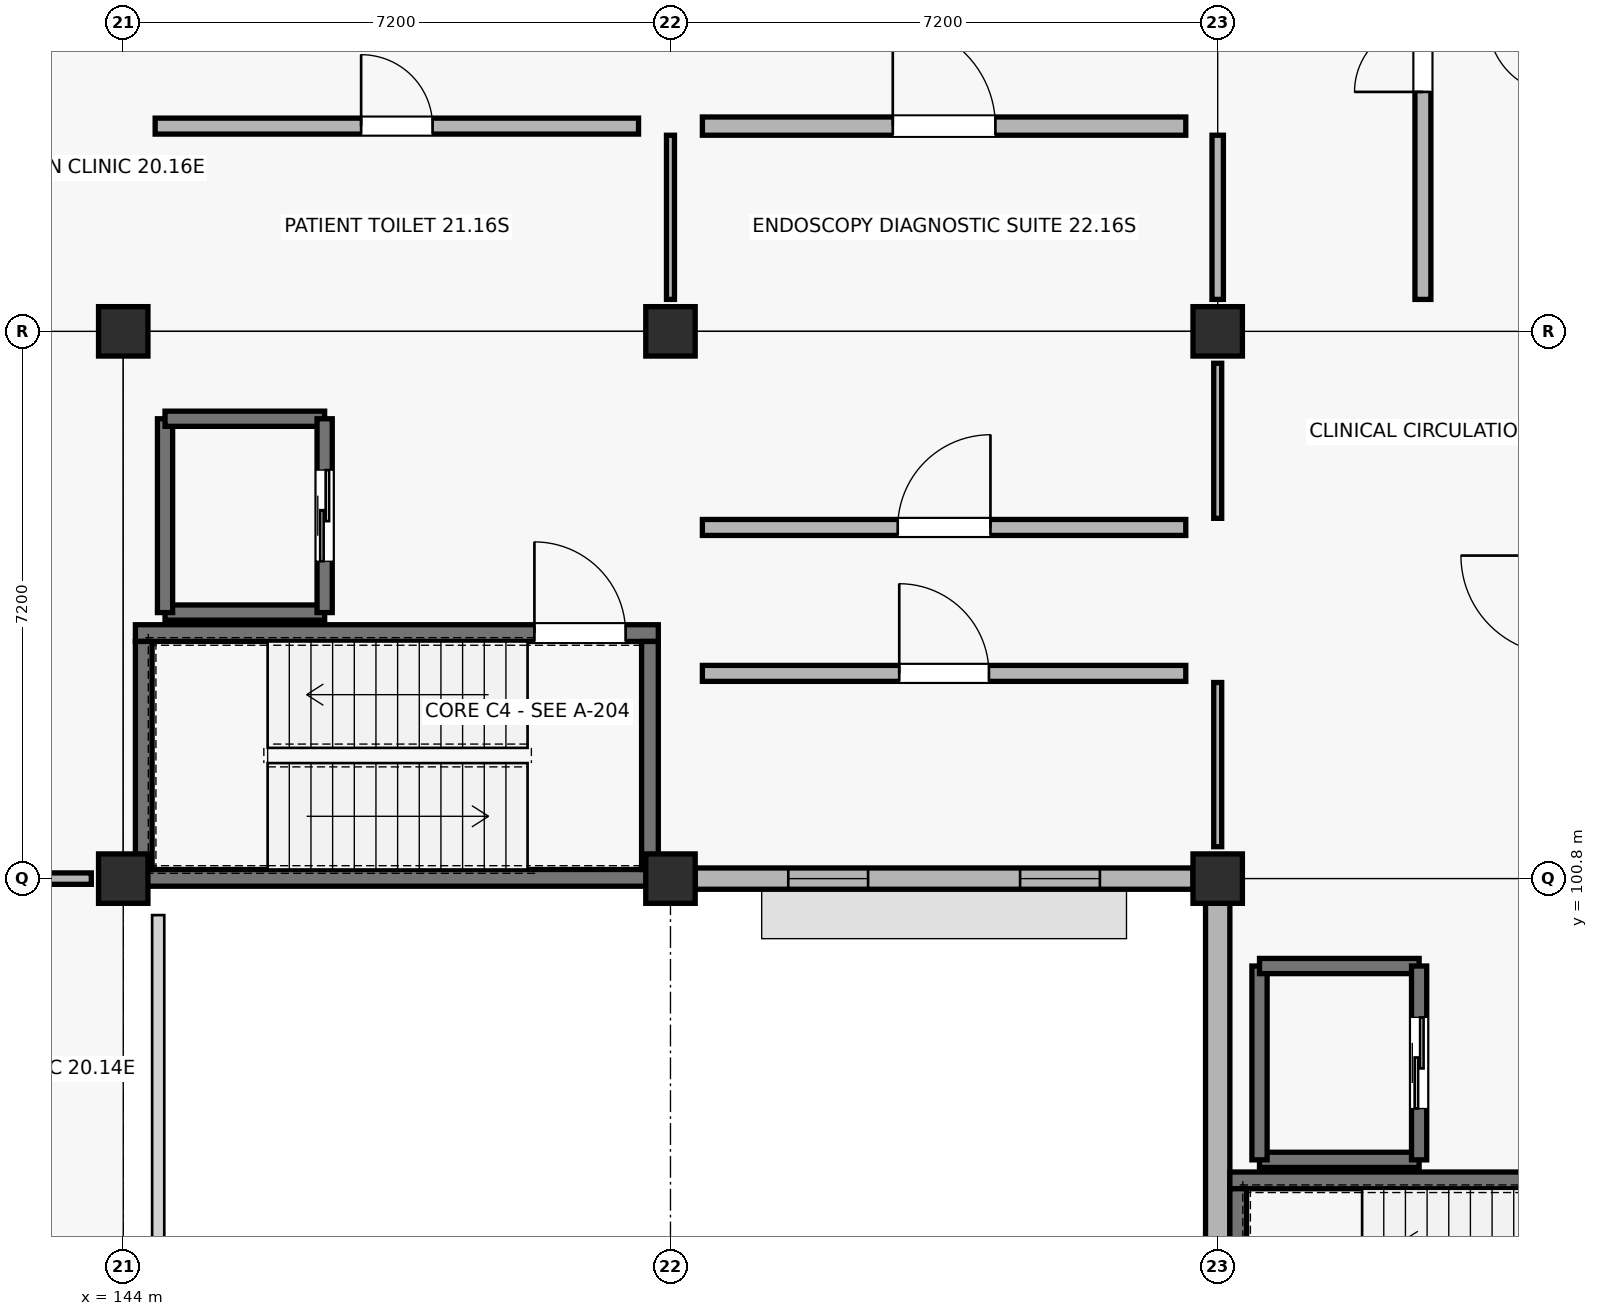
"""IFC4 building model, lengths in metres.
Left out: names, types, materials, properties, quantities, classifications, styles, units other than length and angle.
Written with IfcOpenShell. Run it as: python <this file> out.ifc"""

import sys

from ifc_helpers import new_model, si_unit, direction, frame, frame_2d, origin, origin_2d, place, context, subcontext, project, spatial, rectangle, extrude, element, fill, save


model = new_model("IFC4")
c1 = context("Model", 3, precision=1e-05, world=origin(), true_north=direction((0.0, 1.0)))
c2 = subcontext(c1, "Body", "Model", "MODEL_VIEW")
j1 = project(units=[si_unit("LENGTHUNIT", "METRE"), si_unit("PLANEANGLEUNIT", "RADIAN")], contexts=[c1])
p1 = place(None, origin())
s1 = spatial("IfcSite", under=j1, at=p1, CompositionType="ELEMENT")
p2 = place(p1, origin())
s2 = spatial("IfcBuilding", under=s1, at=p2, CompositionType="ELEMENT")
p3 = place(p2, frame((0.0, 0.0, 4.5)))
s3 = spatial("IfcBuildingStorey", under=s2, at=p3, CompositionType="ELEMENT", Elevation=4.5)
for number, where, z_axis, x_axis in (
    (1, (144.0, 100.8, 0.0), (0.0, 0.0, 1.0), (1.0, 0.0, 0.0)),
    (2, (144.0, 108.0, 0.0), (0.0, 0.0, 1.0), (1.0, 0.0, 0.0)),
    (3, (151.2, 100.8, 0.0), (0.0, 0.0, 1.0), (1.0, 0.0, 0.0)),
    (4, (151.2, 108.0, 0.0), (0.0, 0.0, 1.0), (1.0, 0.0, 0.0)),
    (5, (158.4, 100.8, 0.0), (0.0, 0.0, 1.0), (1.0, 0.0, 0.0)),
    (6, (158.4, 108.0, 0.0), (0.0, 0.0, 1.0), (1.0, 0.0, 0.0)),
):
    element("IfcColumn", number, at=place(p3, frame(where, z_axis=z_axis, x_axis=x_axis)), inside=s3, PredefinedType="COLUMN", context=c2, shape_type="SweptSolid", body=[
        extrude(rectangle(XDim=0.65, YDim=0.65, at=origin_2d()), origin(), (0.0, 0.0, 1.0), 4.5),
    ])
p4 = place(p3, frame((151.525, 100.8, 0.0), z_axis=(0.0, 0.0, 1.0), x_axis=(1.0, 0.0, 0.0)))
e7 = element("IfcWall", 7, at=p4, inside=s3, PredefinedType="STANDARD", context=c2, shape_type="SweptSolid", body=[
    extrude(rectangle(XDim=6.55, YDim=0.28, at=frame_2d((3.275, 0.0))), origin(), (0.0, 0.0, 1.0), 3.47),
])
p5 = place(p4, frame((1.225, 0.0, 0.9)))
e8 = element("IfcOpeningElement", 8, at=p5, cuts=e7, PredefinedType="OPENING", context=c2, shape_type="SweptSolid", body=[
    extrude(rectangle(XDim=1.05, YDim=1.38, at=frame_2d((0.525, 0.69))), frame((0.0, 0.15, 0.0), z_axis=(0.0, -1.0, 0.0), x_axis=(1.0, 0.0, 0.0)), (0.0, 0.0, 1.0), 0.3),
])
p6 = place(p4, frame((4.275, 0.0, 0.9)))
e9 = element("IfcOpeningElement", 9, at=p6, cuts=e7, PredefinedType="OPENING", context=c2, shape_type="SweptSolid", body=[
    extrude(rectangle(XDim=1.05, YDim=1.38, at=frame_2d((0.525, 0.69))), frame((0.0, 0.15, 0.0), z_axis=(0.0, -1.0, 0.0), x_axis=(1.0, 0.0, 0.0)), (0.0, 0.0, 1.0), 0.3),
])
p7 = place(p3, frame((158.4, 100.475, 0.0), z_axis=(0.0, 0.0, 1.0), x_axis=(0.0, -1.0, 0.0)))
e10 = element("IfcWall", 10, at=p7, inside=s3, PredefinedType="STANDARD", context=c2, shape_type="SweptSolid", body=[
    extrude(rectangle(XDim=6.55, YDim=0.32, at=frame_2d((3.275, 0.0))), origin(), (0.0, 0.0, 1.0), 3.52),
])
p8 = place(p3, frame((158.56, 96.83, 0.0), z_axis=(0.0, 0.0, 1.0), x_axis=(1.0, 0.0, 0.0)))
e11 = element("IfcWall", 11, at=p8, inside=s3, PredefinedType="SHEAR", context=c2, shape_type="SweptSolid", body=[
    extrude(rectangle(XDim=6.88, YDim=0.22, at=frame_2d((3.44, 0.0))), origin(), (0.0, 0.0, 1.0), 4.22),
])
p9 = place(p8, frame((5.25, 0.0, 0.0)))
e12 = element("IfcOpeningElement", 12, at=p9, cuts=e11, PredefinedType="OPENING", context=c2, shape_type="SweptSolid", body=[
    extrude(rectangle(XDim=1.2, YDim=2.15, at=frame_2d((0.6, 1.075))), frame((0.0, 0.12, 0.0), z_axis=(0.0, -1.0, 0.0), x_axis=(1.0, 0.0, 0.0)), (0.0, 0.0, 1.0), 0.24),
])
p10 = place(p3, frame((158.67, 93.72, 0.0), z_axis=(0.0, 0.0, 1.0), x_axis=(0.0, 1.0, 0.0)))
e13 = element("IfcWall", 13, at=p10, inside=s3, PredefinedType="SHEAR", context=c2, shape_type="SweptSolid", body=[
    extrude(rectangle(XDim=3.0, YDim=0.22, at=frame_2d((1.5, 0.0))), origin(), (0.0, 0.0, 1.0), 4.22),
])
p11 = place(p3, frame((158.95, 97.1, 0.0), z_axis=(0.0, 0.0, 1.0), x_axis=(1.0, 0.0, 0.0)))
e14 = element("IfcWall", 14, at=p11, inside=s3, PredefinedType="SHEAR", context=c2, shape_type="SweptSolid", body=[
    extrude(rectangle(XDim=2.1, YDim=0.2, at=frame_2d((1.05, 0.0))), origin(), (0.0, 0.0, 1.0), 4.22),
])
p12 = place(p3, frame((158.95, 97.1, 0.0), z_axis=(0.0, 0.0, 1.0), x_axis=(0.0, 1.0, 0.0)))
e15 = element("IfcWall", 15, at=p12, inside=s3, PredefinedType="SHEAR", context=c2, shape_type="SweptSolid", body=[
    extrude(rectangle(XDim=2.55, YDim=0.2, at=frame_2d((1.275, 0.0))), origin(), (0.0, 0.0, 1.0), 4.22),
])
p13 = place(p3, frame((158.95, 99.65, 0.0), z_axis=(0.0, 0.0, 1.0), x_axis=(1.0, 0.0, 0.0)))
e16 = element("IfcWall", 16, at=p13, inside=s3, PredefinedType="SHEAR", context=c2, shape_type="SweptSolid", body=[
    extrude(rectangle(XDim=2.1, YDim=0.2, at=frame_2d((1.05, 0.0))), origin(), (0.0, 0.0, 1.0), 4.22),
])
p14 = place(p3, frame((161.05, 97.1, 0.0), z_axis=(0.0, 0.0, 1.0), x_axis=(0.0, 1.0, 0.0)))
e17 = element("IfcWall", 17, at=p14, inside=s3, PredefinedType="SHEAR", context=c2, shape_type="SweptSolid", body=[
    extrude(rectangle(XDim=2.55, YDim=0.2, at=frame_2d((1.275, 0.0))), origin(), (0.0, 0.0, 1.0), 4.22),
])
p15 = place(p14, frame((0.675, 0.0, 0.0)))
e18 = element("IfcOpeningElement", 18, at=p15, cuts=e17, PredefinedType="OPENING", context=c2, shape_type="SweptSolid", body=[
    extrude(rectangle(XDim=1.2, YDim=2.15, at=frame_2d((0.6, 1.075))), frame((0.0, 0.11, 0.0), z_axis=(0.0, -1.0, 0.0), x_axis=(1.0, 0.0, 0.0)), (0.0, 0.0, 1.0), 0.22),
])
p16 = place(p3, frame((144.16, 100.81, 0.0), z_axis=(0.0, 0.0, 1.0), x_axis=(1.0, 0.0, 0.0)))
e19 = element("IfcWall", 19, at=p16, inside=s3, PredefinedType="SHEAR", context=c2, shape_type="SweptSolid", body=[
    extrude(rectangle(XDim=6.88, YDim=0.22, at=frame_2d((3.44, 0.0))), origin(), (0.0, 0.0, 1.0), 4.22),
])
p17 = place(p3, frame((144.16, 104.03, 0.0), z_axis=(0.0, 0.0, 1.0), x_axis=(1.0, 0.0, 0.0)))
e20 = element("IfcWall", 20, at=p17, inside=s3, PredefinedType="SHEAR", context=c2, shape_type="SweptSolid", body=[
    extrude(rectangle(XDim=6.88, YDim=0.22, at=frame_2d((3.44, 0.0))), origin(), (0.0, 0.0, 1.0), 4.22),
])
p18 = place(p17, frame((5.25, 0.0, 0.0)))
e21 = element("IfcOpeningElement", 21, at=p18, cuts=e20, PredefinedType="OPENING", context=c2, shape_type="SweptSolid", body=[
    extrude(rectangle(XDim=1.2, YDim=2.15, at=frame_2d((0.6, 1.075))), frame((0.0, 0.12, 0.0), z_axis=(0.0, -1.0, 0.0), x_axis=(1.0, 0.0, 0.0)), (0.0, 0.0, 1.0), 0.24),
])
for number, where, z_axis, x_axis in (
    (22, (144.27, 100.92, 0.0), (0.0, 0.0, 1.0), (0.0, 1.0, 0.0)),
    (23, (150.93, 100.92, 0.0), (0.0, 0.0, 1.0), (0.0, 1.0, 0.0)),
):
    element("IfcWall", number, at=place(p3, frame(where, z_axis=z_axis, x_axis=x_axis)), inside=s3, PredefinedType="SHEAR", context=c2, shape_type="SweptSolid", body=[
        extrude(rectangle(XDim=3.0, YDim=0.22, at=frame_2d((1.5, 0.0))), origin(), (0.0, 0.0, 1.0), 4.22),
    ])
p19 = place(p3, frame((144.55, 104.3, 0.0), z_axis=(0.0, 0.0, 1.0), x_axis=(1.0, 0.0, 0.0)))
e24 = element("IfcWall", 24, at=p19, inside=s3, PredefinedType="SHEAR", context=c2, shape_type="SweptSolid", body=[
    extrude(rectangle(XDim=2.1, YDim=0.2, at=frame_2d((1.05, 0.0))), origin(), (0.0, 0.0, 1.0), 4.22),
])
p20 = place(p3, frame((144.55, 104.3, 0.0), z_axis=(0.0, 0.0, 1.0), x_axis=(0.0, 1.0, 0.0)))
e25 = element("IfcWall", 25, at=p20, inside=s3, PredefinedType="SHEAR", context=c2, shape_type="SweptSolid", body=[
    extrude(rectangle(XDim=2.55, YDim=0.2, at=frame_2d((1.275, 0.0))), origin(), (0.0, 0.0, 1.0), 4.22),
])
p21 = place(p3, frame((144.55, 106.85, 0.0), z_axis=(0.0, 0.0, 1.0), x_axis=(1.0, 0.0, 0.0)))
e26 = element("IfcWall", 26, at=p21, inside=s3, PredefinedType="SHEAR", context=c2, shape_type="SweptSolid", body=[
    extrude(rectangle(XDim=2.1, YDim=0.2, at=frame_2d((1.05, 0.0))), origin(), (0.0, 0.0, 1.0), 4.22),
])
p22 = place(p3, frame((146.65, 104.3, 0.0), z_axis=(0.0, 0.0, 1.0), x_axis=(0.0, 1.0, 0.0)))
e27 = element("IfcWall", 27, at=p22, inside=s3, PredefinedType="SHEAR", context=c2, shape_type="SweptSolid", body=[
    extrude(rectangle(XDim=2.55, YDim=0.2, at=frame_2d((1.275, 0.0))), origin(), (0.0, 0.0, 1.0), 4.22),
])
p23 = place(p22, frame((0.675, 0.0, 0.0)))
e28 = element("IfcOpeningElement", 28, at=p23, cuts=e27, PredefinedType="OPENING", context=c2, shape_type="SweptSolid", body=[
    extrude(rectangle(XDim=1.2, YDim=2.15, at=frame_2d((0.6, 1.075))), frame((0.0, 0.11, 0.0), z_axis=(0.0, -1.0, 0.0), x_axis=(1.0, 0.0, 0.0)), (0.0, 0.0, 1.0), 0.22),
])
p24 = place(p3, frame((141.42, 100.8, 0.0), z_axis=(0.0, 0.0, 1.0), x_axis=(1.0, 0.0, 0.0)))
e29 = element("IfcWall", 29, at=p24, inside=s3, PredefinedType="PARTITIONING", context=c2, shape_type="SweptSolid", body=[
    extrude(rectangle(XDim=2.16, YDim=0.15, at=frame_2d((1.08, 0.0))), origin(), (0.0, 0.0, 1.0), 3.36),
])
p25 = place(p3, frame((144.42, 110.7, 0.0), z_axis=(0.0, 0.0, 1.0), x_axis=(1.0, 0.0, 0.0)))
e30 = element("IfcWall", 30, at=p25, inside=s3, PredefinedType="PLUMBINGWALL", context=c2, shape_type="SweptSolid", body=[
    extrude(rectangle(XDim=6.36, YDim=0.21, at=frame_2d((3.18, 0.0))), origin(), (0.0, 0.0, 1.0), 3.36),
])
p26 = place(p25, frame((2.71, 0.0, 0.0)))
e31 = element("IfcOpeningElement", 31, at=p26, cuts=e30, PredefinedType="OPENING", context=c2, shape_type="SweptSolid", body=[
    extrude(rectangle(XDim=0.94, YDim=2.19, at=frame_2d((0.47, 1.095))), frame((0.0, 0.115, 0.0), z_axis=(0.0, -1.0, 0.0), x_axis=(1.0, 0.0, 0.0)), (0.0, 0.0, 1.0), 0.23),
])
p27 = place(p3, frame((151.2, 108.42, 0.0), z_axis=(0.0, 0.0, 1.0), x_axis=(0.0, 1.0, 0.0)))
e32 = element("IfcWall", 32, at=p27, inside=s3, PredefinedType="PARTITIONING", context=c2, shape_type="SweptSolid", body=[
    extrude(rectangle(XDim=2.16, YDim=0.105, at=frame_2d((1.08, 0.0))), origin(), (0.0, 0.0, 1.0), 3.36),
])
p28 = place(p3, frame((151.62, 103.5, 0.0), z_axis=(0.0, 0.0, 1.0), x_axis=(1.0, 0.0, 0.0)))
e33 = element("IfcWall", 33, at=p28, inside=s3, PredefinedType="PLUMBINGWALL", context=c2, shape_type="SweptSolid", body=[
    extrude(rectangle(XDim=6.36, YDim=0.21, at=frame_2d((3.18, 0.0))), origin(), (0.0, 0.0, 1.0), 3.36),
])
p29 = place(p28, frame((2.59, 0.0, 0.0)))
e34 = element("IfcOpeningElement", 34, at=p29, cuts=e33, PredefinedType="OPENING", context=c2, shape_type="SweptSolid", body=[
    extrude(rectangle(XDim=1.18, YDim=2.19, at=frame_2d((0.59, 1.095))), frame((0.0, 0.115, 0.0), z_axis=(0.0, -1.0, 0.0), x_axis=(1.0, 0.0, 0.0)), (0.0, 0.0, 1.0), 0.23),
])
p30 = place(p3, frame((158.4, 101.22, 0.0), z_axis=(0.0, 0.0, 1.0), x_axis=(0.0, 1.0, 0.0)))
e35 = element("IfcWall", 35, at=p30, inside=s3, PredefinedType="PARTITIONING", context=c2, shape_type="SweptSolid", body=[
    extrude(rectangle(XDim=2.16, YDim=0.105, at=frame_2d((1.08, 0.0))), origin(), (0.0, 0.0, 1.0), 3.36),
])
p31 = place(p3, frame((151.62, 105.42, 0.0), z_axis=(0.0, 0.0, 1.0), x_axis=(1.0, 0.0, 0.0)))
e36 = element("IfcWall", 36, at=p31, inside=s3, PredefinedType="PLUMBINGWALL", context=c2, shape_type="SweptSolid", body=[
    extrude(rectangle(XDim=6.36, YDim=0.21, at=frame_2d((3.18, 0.0))), origin(), (0.0, 0.0, 1.0), 3.36),
])
p32 = place(p31, frame((2.57, 0.0, 0.0)))
e37 = element("IfcOpeningElement", 37, at=p32, cuts=e36, PredefinedType="OPENING", context=c2, shape_type="SweptSolid", body=[
    extrude(rectangle(XDim=1.22, YDim=2.19, at=frame_2d((0.61, 1.095))), frame((0.0, 0.115, 0.0), z_axis=(0.0, -1.0, 0.0), x_axis=(1.0, 0.0, 0.0)), (0.0, 0.0, 1.0), 0.23),
])
p33 = place(p3, frame((158.4, 105.54, 0.0), z_axis=(0.0, 0.0, 1.0), x_axis=(0.0, 1.0, 0.0)))
e38 = element("IfcWall", 38, at=p33, inside=s3, PredefinedType="PARTITIONING", context=c2, shape_type="SweptSolid", body=[
    extrude(rectangle(XDim=2.04, YDim=0.105, at=frame_2d((1.02, 0.0))), origin(), (0.0, 0.0, 1.0), 3.36),
])
p34 = place(p3, frame((151.62, 110.7, 0.0), z_axis=(0.0, 0.0, 1.0), x_axis=(1.0, 0.0, 0.0)))
e39 = element("IfcWall", 39, at=p34, inside=s3, PredefinedType="SOLIDWALL", context=c2, shape_type="SweptSolid", body=[
    extrude(rectangle(XDim=6.36, YDim=0.24, at=frame_2d((3.18, 0.0))), origin(), (0.0, 0.0, 1.0), 3.36),
])
p35 = place(p34, frame((2.505, 0.0, 0.0)))
e40 = element("IfcOpeningElement", 40, at=p35, cuts=e39, PredefinedType="OPENING", context=c2, shape_type="SweptSolid", body=[
    extrude(rectangle(XDim=1.35, YDim=2.2, at=frame_2d((0.675, 1.1))), frame((0.0, 0.13, 0.0), z_axis=(0.0, -1.0, 0.0), x_axis=(1.0, 0.0, 0.0)), (0.0, 0.0, 1.0), 0.26),
])
p36 = place(p3, frame((158.4, 108.42, 0.0), z_axis=(0.0, 0.0, 1.0), x_axis=(0.0, 1.0, 0.0)))
e41 = element("IfcWall", 41, at=p36, inside=s3, PredefinedType="PARTITIONING", context=c2, shape_type="SweptSolid", body=[
    extrude(rectangle(XDim=2.16, YDim=0.15, at=frame_2d((1.08, 0.0))), origin(), (0.0, 0.0, 1.0), 3.36),
])
p37 = place(p3, frame((161.1, 108.42, 0.0), z_axis=(0.0, 0.0, 1.0), x_axis=(0.0, 1.0, 0.0)))
e42 = element("IfcWall", 42, at=p37, inside=s3, PredefinedType="PLUMBINGWALL", context=c2, shape_type="SweptSolid", body=[
    extrude(rectangle(XDim=6.36, YDim=0.21, at=frame_2d((3.18, 0.0))), origin(), (0.0, 0.0, 1.0), 3.36),
])
p38 = place(p37, frame((2.73, 0.0, 0.0)))
e43 = element("IfcOpeningElement", 43, at=p38, cuts=e42, PredefinedType="OPENING", context=c2, shape_type="SweptSolid", body=[
    extrude(rectangle(XDim=0.9, YDim=2.04, at=frame_2d((0.45, 1.02))), frame((0.0, 0.115, 0.0), z_axis=(0.0, -1.0, 0.0), x_axis=(1.0, 0.0, 0.0)), (0.0, 0.0, 1.0), 0.23),
])
p39 = place(p5, origin())
e44 = element("IfcWindow", 44, at=p39, inside=s3, PartitioningType="SINGLE_PANEL", PredefinedType="WINDOW", context=c2, shape_type="SweptSolid", body=[
    extrude(rectangle(XDim=1.05, YDim=1.38, at=frame_2d((0.525, 0.69))), frame((0.0, 0.03, 0.0), z_axis=(0.0, -1.0, 0.0), x_axis=(1.0, 0.0, 0.0)), (0.0, 0.0, 1.0), 0.06),
])
fill(e8, e44)
p40 = place(p6, origin())
e45 = element("IfcWindow", 45, at=p40, inside=s3, PartitioningType="SINGLE_PANEL", PredefinedType="WINDOW", context=c2, shape_type="SweptSolid", body=[
    extrude(rectangle(XDim=1.05, YDim=1.38, at=frame_2d((0.525, 0.69))), frame((0.0, 0.03, 0.0), z_axis=(0.0, -1.0, 0.0), x_axis=(1.0, 0.0, 0.0)), (0.0, 0.0, 1.0), 0.06),
])
fill(e9, e45)
p41 = place(p15, origin())
e46 = element("IfcDoor", 46, at=p41, inside=s3, OperationType="SLIDING_TO_LEFT", PredefinedType="DOOR", context=c2, shape_type="SweptSolid", body=[
    extrude(rectangle(XDim=1.2, YDim=2.15, at=frame_2d((0.6, 1.075))), frame((0.0, 0.025, 0.0), z_axis=(0.0, -1.0, 0.0), x_axis=(1.0, 0.0, 0.0)), (0.0, 0.0, 1.0), 0.05),
])
fill(e18, e46)
p42 = place(p18, origin())
e47 = element("IfcDoor", 47, at=p42, inside=s3, OperationType="SINGLE_SWING_LEFT", PredefinedType="DOOR", context=c2, shape_type="SweptSolid", body=[
    extrude(rectangle(XDim=1.2, YDim=2.15, at=frame_2d((0.6, 1.075))), frame((0.0, 0.025, 0.0), z_axis=(0.0, -1.0, 0.0), x_axis=(1.0, 0.0, 0.0)), (0.0, 0.0, 1.0), 0.05),
])
fill(e21, e47)
p43 = place(p23, origin())
e48 = element("IfcDoor", 48, at=p43, inside=s3, OperationType="SLIDING_TO_LEFT", PredefinedType="DOOR", context=c2, shape_type="SweptSolid", body=[
    extrude(rectangle(XDim=1.2, YDim=2.15, at=frame_2d((0.6, 1.075))), frame((0.0, 0.025, 0.0), z_axis=(0.0, -1.0, 0.0), x_axis=(1.0, 0.0, 0.0)), (0.0, 0.0, 1.0), 0.05),
])
fill(e28, e48)
p44 = place(p26, origin())
e49 = element("IfcDoor", 49, at=p44, inside=s3, OperationType="SINGLE_SWING_LEFT", PredefinedType="DOOR", context=c2, shape_type="SweptSolid", body=[
    extrude(rectangle(XDim=0.94, YDim=2.19, at=frame_2d((0.47, 1.095))), frame((0.0, 0.025, 0.0), z_axis=(0.0, -1.0, 0.0), x_axis=(1.0, 0.0, 0.0)), (0.0, 0.0, 1.0), 0.05),
])
fill(e31, e49)
p45 = place(p29, origin())
e50 = element("IfcDoor", 50, at=p45, inside=s3, OperationType="SINGLE_SWING_LEFT", PredefinedType="DOOR", context=c2, shape_type="SweptSolid", body=[
    extrude(rectangle(XDim=1.18, YDim=2.19, at=frame_2d((0.59, 1.095))), frame((0.0, 0.025, 0.0), z_axis=(0.0, -1.0, 0.0), x_axis=(1.0, 0.0, 0.0)), (0.0, 0.0, 1.0), 0.05),
])
fill(e34, e50)
p46 = place(p32, origin())
e51 = element("IfcDoor", 51, at=p46, inside=s3, OperationType="SINGLE_SWING_RIGHT", PredefinedType="DOOR", context=c2, shape_type="SweptSolid", body=[
    extrude(rectangle(XDim=1.22, YDim=2.19, at=frame_2d((0.61, 1.095))), frame((0.0, 0.025, 0.0), z_axis=(0.0, -1.0, 0.0), x_axis=(1.0, 0.0, 0.0)), (0.0, 0.0, 1.0), 0.05),
])
fill(e37, e51)
p47 = place(p35, origin())
e52 = element("IfcDoor", 52, at=p47, inside=s3, OperationType="SINGLE_SWING_LEFT", PredefinedType="DOOR", context=c2, shape_type="SweptSolid", body=[
    extrude(rectangle(XDim=1.35, YDim=2.2, at=frame_2d((0.675, 1.1))), frame((0.0, 0.025, 0.0), z_axis=(0.0, -1.0, 0.0), x_axis=(1.0, 0.0, 0.0)), (0.0, 0.0, 1.0), 0.05),
])
fill(e40, e52)
p48 = place(p38, origin())
e53 = element("IfcDoor", 53, at=p48, inside=s3, OperationType="SINGLE_SWING_LEFT", PredefinedType="DOOR", context=c2, shape_type="SweptSolid", body=[
    extrude(rectangle(XDim=0.9, YDim=2.04, at=frame_2d((0.45, 1.02))), frame((0.0, 0.025, 0.0), z_axis=(0.0, -1.0, 0.0), x_axis=(1.0, 0.0, 0.0)), (0.0, 0.0, 1.0), 0.05),
])
fill(e43, e53)
save(model, sys.argv[1])
